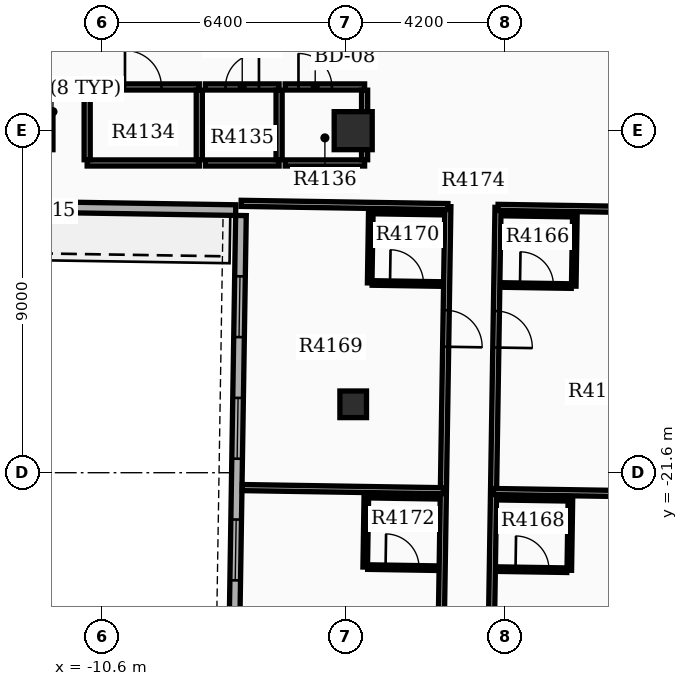
"""IFC4 building model, lengths in metres.
Left out: names, types, materials, properties, quantities, classifications, styles, units other than length and angle.
Written with IfcOpenShell. Run it as: python <this file> out.ifc"""

import sys

from ifc_helpers import new_model, si_unit, direction, frame, frame_2d, origin, origin_2d, place, context, subcontext, project, spatial, rectangle, extrude, element, fill, save


model = new_model("IFC4")
c1 = context("Model", 3, precision=1e-05, world=origin(), true_north=direction((0.0, 1.0)))
c2 = subcontext(c1, "Body", "Model", "MODEL_VIEW")
j1 = project(units=[si_unit("LENGTHUNIT", "METRE"), si_unit("PLANEANGLEUNIT", "RADIAN")], contexts=[c1])
p1 = place(None, origin())
s1 = spatial("IfcSite", under=j1, at=p1, CompositionType="ELEMENT")
p2 = place(p1, origin())
s2 = spatial("IfcBuilding", under=s1, at=p2, CompositionType="ELEMENT")
p3 = place(p2, frame((0.0, 0.0, 261.6)))
s3 = spatial("IfcBuildingStorey", under=s2, at=p3, CompositionType="ELEMENT", Elevation=261.6)
for number, where, z_axis, x_axis in (
    (1, (-12.4, -12.6, 0.0), (0.0, 0.0, 1.0), (1.0, 0.0, 0.0)),
    (2, (-4.0, -12.6, 0.0), (0.0, 0.0, 1.0), (1.0, 0.0, 0.0)),
):
    element("IfcColumn", number, at=place(p3, frame(where, z_axis=z_axis, x_axis=x_axis)), inside=s3, PredefinedType="COLUMN", context=c2, shape_type="SweptSolid", body=[
        extrude(rectangle(XDim=1.0, YDim=1.0, at=origin_2d()), origin(), (0.0, 0.0, 1.0), 3.9),
    ])
p4 = place(p3, frame((-4.0, -19.8, 0.0), z_axis=(0.0, 0.0, 1.0), x_axis=(1.0, 0.0, 0.0)))
e3 = element("IfcColumn", 3, at=p4, inside=s3, PredefinedType="COLUMN", context=c2, shape_type="SweptSolid", body=[
    extrude(rectangle(XDim=0.7, YDim=0.7, at=origin_2d()), origin(), (0.0, 0.0, 1.0), 3.9),
])
p5 = place(p3, frame((-6.954, -14.833, 0.0), z_axis=(0.0, 0.0, 1.0), x_axis=(-0.015711302158, -0.999876569875, 0.0)))
e4 = element("IfcWall", 4, at=p5, inside=s3, PredefinedType="STANDARD", context=c2, shape_type="SweptSolid", body=[
    extrude(rectangle(XDim=14.7, YDim=0.28, at=frame_2d((7.35, 0.0))), origin(), (0.0, 0.0, 1.0), 3.18),
])
p6 = place(p5, frame((1.6, 0.0, 0.8)))
e5 = element("IfcOpeningElement", 5, at=p6, cuts=e4, PredefinedType="OPENING", context=c2, shape_type="SweptSolid", body=[
    extrude(rectangle(XDim=1.6, YDim=1.7, at=frame_2d((0.8, 0.85))), frame((0.0, 0.15, 0.0), z_axis=(0.0, -1.0, 0.0), x_axis=(1.0, 0.0, 0.0)), (0.0, 0.0, 1.0), 0.3),
])
p7 = place(p5, frame((4.8, 0.0, 0.8)))
e6 = element("IfcOpeningElement", 6, at=p7, cuts=e4, PredefinedType="OPENING", context=c2, shape_type="SweptSolid", body=[
    extrude(rectangle(XDim=1.6, YDim=1.7, at=frame_2d((0.8, 0.85))), frame((0.0, 0.15, 0.0), z_axis=(0.0, -1.0, 0.0), x_axis=(1.0, 0.0, 0.0)), (0.0, 0.0, 1.0), 0.3),
])
p8 = place(p5, frame((8.0, 0.0, 0.8)))
e7 = element("IfcOpeningElement", 7, at=p8, cuts=e4, PredefinedType="OPENING", context=c2, shape_type="SweptSolid", body=[
    extrude(rectangle(XDim=1.6, YDim=1.7, at=frame_2d((0.8, 0.85))), frame((0.0, 0.15, 0.0), z_axis=(0.0, -1.0, 0.0), x_axis=(1.0, 0.0, 0.0)), (0.0, 0.0, 1.0), 0.3),
])
p9 = place(p5, frame((11.2, 0.0, 0.8)))
e8 = element("IfcOpeningElement", 8, at=p9, cuts=e4, PredefinedType="OPENING", context=c2, shape_type="SweptSolid", body=[
    extrude(rectangle(XDim=1.6, YDim=1.7, at=frame_2d((0.8, 0.85))), frame((0.0, 0.15, 0.0), z_axis=(0.0, -1.0, 0.0), x_axis=(1.0, 0.0, 0.0)), (0.0, 0.0, 1.0), 0.3),
])
p10 = place(p3, frame((-13.391, -14.592, 0.0), z_axis=(0.0, 0.0, 1.0), x_axis=(0.999876833368, -0.015694524359, 0.0)))
e9 = element("IfcWall", 9, at=p10, inside=s3, PredefinedType="STANDARD", context=c2, shape_type="SweptSolid", body=[
    extrude(rectangle(XDim=6.3, YDim=0.28, at=frame_2d((3.15, 0.0))), origin(), (0.0, 0.0, 1.0), 3.18),
])
p11 = place(p3, frame((-11.0, -13.45, 0.0), z_axis=(0.0, 0.0, 1.0), x_axis=(1.0, 0.0, 0.0)))
e10 = element("IfcWall", 10, at=p11, inside=s3, PredefinedType="PARTITIONING", context=c2, shape_type="SweptSolid", body=[
    extrude(rectangle(XDim=2.95, YDim=0.16, at=frame_2d((1.475, 0.0))), origin(), (0.0, 0.0, 1.0), 3.17),
])
p12 = place(p3, frame((-11.0, -11.45, 0.0), z_axis=(0.0, 0.0, 1.0), x_axis=(1.0, 0.0, 0.0)))
e11 = element("IfcWall", 11, at=p12, inside=s3, PredefinedType="PARTITIONING", context=c2, shape_type="SweptSolid", body=[
    extrude(rectangle(XDim=2.95, YDim=0.16, at=frame_2d((1.475, 0.0))), origin(), (0.0, 0.0, 1.0), 3.17),
])
p13 = place(p12, frame((0.995, 0.0, 0.0)))
e12 = element("IfcOpeningElement", 12, at=p13, cuts=e11, PredefinedType="OPENING", context=c2, shape_type="SweptSolid", body=[
    extrude(rectangle(XDim=0.96, YDim=2.15, at=frame_2d((0.48, 1.075))), frame((0.0, 0.09, 0.0), z_axis=(0.0, -1.0, 0.0), x_axis=(1.0, 0.0, 0.0)), (0.0, 0.0, 1.0), 0.18),
])
for number, where, z_axis, x_axis in (
    (13, (-11.0, -13.365, 0.0), (0.0, 0.0, 1.0), (0.0, 1.0, 0.0)),
    (14, (-8.05, -13.365, 0.0), (0.0, 0.0, 1.0), (0.0, 1.0, 0.0)),
):
    element("IfcWall", number, at=place(p3, frame(where, z_axis=z_axis, x_axis=x_axis)), inside=s3, PredefinedType="PARTITIONING", context=c2, shape_type="SweptSolid", body=[
        extrude(rectangle(XDim=1.83, YDim=0.16, at=frame_2d((0.915, 0.0))), origin(), (0.0, 0.0, 1.0), 3.17),
    ])
p14 = place(p3, frame((-7.89, -13.45, 0.0), z_axis=(0.0, 0.0, 1.0), x_axis=(1.0, 0.0, 0.0)))
e15 = element("IfcWall", 15, at=p14, inside=s3, PredefinedType="PARTITIONING", context=c2, shape_type="SweptSolid", body=[
    extrude(rectangle(XDim=1.94, YDim=0.16, at=frame_2d((0.97, 0.0))), origin(), (0.0, 0.0, 1.0), 3.17),
])
p15 = place(p3, frame((-7.89, -11.45, 0.0), z_axis=(0.0, 0.0, 1.0), x_axis=(1.0, 0.0, 0.0)))
e16 = element("IfcWall", 16, at=p15, inside=s3, PredefinedType="PARTITIONING", context=c2, shape_type="SweptSolid", body=[
    extrude(rectangle(XDim=1.94, YDim=0.16, at=frame_2d((0.97, 0.0))), origin(), (0.0, 0.0, 1.0), 3.17),
])
p16 = place(p15, frame((0.53, 0.0, 0.0)))
e17 = element("IfcOpeningElement", 17, at=p16, cuts=e16, PredefinedType="OPENING", context=c2, shape_type="SweptSolid", body=[
    extrude(rectangle(XDim=0.88, YDim=2.1, at=frame_2d((0.44, 1.05))), frame((0.0, 0.09, 0.0), z_axis=(0.0, -1.0, 0.0), x_axis=(1.0, 0.0, 0.0)), (0.0, 0.0, 1.0), 0.18),
])
p17 = place(p3, frame((-5.95, -13.365, 0.0), z_axis=(0.0, 0.0, 1.0), x_axis=(0.0, 1.0, 0.0)))
e18 = element("IfcWall", 18, at=p17, inside=s3, PredefinedType="PARTITIONING", context=c2, shape_type="SweptSolid", body=[
    extrude(rectangle(XDim=1.83, YDim=0.16, at=frame_2d((0.915, 0.0))), origin(), (0.0, 0.0, 1.0), 3.17),
])
p18 = place(p3, frame((-5.79, -13.45, 0.0), z_axis=(0.0, 0.0, 1.0), x_axis=(1.0, 0.0, 0.0)))
e19 = element("IfcWall", 19, at=p18, inside=s3, PredefinedType="PARTITIONING", context=c2, shape_type="SweptSolid", body=[
    extrude(rectangle(XDim=2.09, YDim=0.16, at=frame_2d((1.045, 0.0))), origin(), (0.0, 0.0, 1.0), 3.17),
])
p19 = place(p3, frame((-5.79, -11.45, 0.0), z_axis=(0.0, 0.0, 1.0), x_axis=(1.0, 0.0, 0.0)))
e20 = element("IfcWall", 20, at=p19, inside=s3, PredefinedType="PARTITIONING", context=c2, shape_type="SweptSolid", body=[
    extrude(rectangle(XDim=2.09, YDim=0.16, at=frame_2d((1.045, 0.0))), origin(), (0.0, 0.0, 1.0), 3.17),
])
p20 = place(p19, frame((0.35, 0.0, 0.0)))
e21 = element("IfcOpeningElement", 21, at=p20, cuts=e20, PredefinedType="OPENING", context=c2, shape_type="SweptSolid", body=[
    extrude(rectangle(XDim=0.88, YDim=2.15, at=frame_2d((0.44, 1.075))), frame((0.0, 0.09, 0.0), z_axis=(0.0, -1.0, 0.0), x_axis=(1.0, 0.0, 0.0)), (0.0, 0.0, 1.0), 0.18),
])
p21 = place(p3, frame((-3.7, -13.365, 0.0), z_axis=(0.0, 0.0, 1.0), x_axis=(0.0, 1.0, 0.0)))
e22 = element("IfcWall", 22, at=p21, inside=s3, PredefinedType="PARTITIONING", context=c2, shape_type="SweptSolid", body=[
    extrude(rectangle(XDim=1.83, YDim=0.16, at=frame_2d((0.915, 0.0))), origin(), (0.0, 0.0, 1.0), 3.17),
])
p22 = place(p3, frame((-0.19, -14.619, 0.0), z_axis=(0.0, 0.0, 1.0), x_axis=(-0.015710232149, -0.999876586687, 0.0)))
e23 = element("IfcWall", 23, at=p22, inside=s3, PredefinedType="PARTITIONING", context=c2, shape_type="SweptSolid", body=[
    extrude(rectangle(XDim=15.012, YDim=0.16, at=frame_2d((7.506, 0.0))), origin(), (0.0, 0.0, 1.0), 3.17),
])
p23 = place(p22, frame((2.728, 0.0, 0.0)))
e24 = element("IfcOpeningElement", 24, at=p23, cuts=e23, PredefinedType="OPENING", context=c2, shape_type="SweptSolid", body=[
    extrude(rectangle(XDim=0.96, YDim=2.15, at=frame_2d((0.48, 1.075))), frame((0.0, 0.09, 0.0), z_axis=(0.0, -1.0, 0.0), x_axis=(1.0, 0.0, 0.0)), (0.0, 0.0, 1.0), 0.18),
])
p24 = place(p22, frame((13.76, 0.0, 0.0)))
e25 = element("IfcOpeningElement", 25, at=p24, cuts=e23, PredefinedType="OPENING", context=c2, shape_type="SweptSolid", body=[
    extrude(rectangle(XDim=0.96, YDim=2.15, at=frame_2d((0.48, 1.075))), frame((0.0, 0.09, 0.0), z_axis=(0.0, -1.0, 0.0), x_axis=(1.0, 0.0, 0.0)), (0.0, 0.0, 1.0), 0.18),
])
p25 = place(p3, frame((-0.19, -14.619, 0.0), z_axis=(0.0, 0.0, 1.0), x_axis=(0.999877076246, -0.015679043267, 0.0)))
e26 = element("IfcWall", 26, at=p25, inside=s3, PredefinedType="PARTITIONING", context=c2, shape_type="SweptSolid", body=[
    extrude(rectangle(XDim=6.68, YDim=0.16, at=frame_2d((3.34, 0.0))), origin(), (0.0, 0.0, 1.0), 3.17),
])
p26 = place(p3, frame((-0.307, -22.095, 0.0), z_axis=(0.0, 0.0, 1.0), x_axis=(0.999876781534, -0.015697826265, 0.0)))
e27 = element("IfcWall", 27, at=p26, inside=s3, PredefinedType="PARTITIONING", context=c2, shape_type="SweptSolid", body=[
    extrude(rectangle(XDim=6.532, YDim=0.16, at=frame_2d((3.266, 0.0))), origin(), (0.0, 0.0, 1.0), 3.17),
])
p27 = place(p3, frame((-0.082, -16.661, 0.0), z_axis=(0.0, 0.0, 1.0), x_axis=(0.999876836305, -0.015694337248, 0.0)))
e28 = element("IfcWall", 28, at=p27, inside=s3, PredefinedType="PARTITIONING", context=c2, shape_type="SweptSolid", body=[
    extrude(rectangle(XDim=1.82, YDim=0.12, at=frame_2d((0.91, 0.0))), origin(), (0.0, 0.0, 1.0), 3.17),
])
p28 = place(p27, frame((0.47, 0.0, 0.0)))
e29 = element("IfcOpeningElement", 29, at=p28, cuts=e28, PredefinedType="OPENING", context=c2, shape_type="SweptSolid", body=[
    extrude(rectangle(XDim=0.88, YDim=2.1, at=frame_2d((0.44, 1.05))), frame((0.0, 0.07, 0.0), z_axis=(0.0, -1.0, 0.0), x_axis=(1.0, 0.0, 0.0)), (0.0, 0.0, 1.0), 0.14),
])
p29 = place(p3, frame((-0.052, -14.781, 0.0), z_axis=(0.0, 0.0, 1.0), x_axis=(0.999876836305, -0.015694337248, 0.0)))
e30 = element("IfcWall", 30, at=p29, inside=s3, PredefinedType="PARTITIONING", context=c2, shape_type="SweptSolid", body=[
    extrude(rectangle(XDim=1.82, YDim=0.12, at=frame_2d((0.91, 0.0))), origin(), (0.0, 0.0, 1.0), 3.17),
])
p30 = place(p3, frame((1.833, -14.811, 0.0), z_axis=(0.0, 0.0, 1.0), x_axis=(-0.01571234584, -0.999876553475, 0.0)))
e31 = element("IfcWall", 31, at=p30, inside=s3, PredefinedType="PARTITIONING", context=c2, shape_type="SweptSolid", body=[
    extrude(rectangle(XDim=1.88, YDim=0.12, at=frame_2d((0.94, 0.0))), origin(), (0.0, 0.0, 1.0), 3.17),
])
p31 = place(p3, frame((-0.199, -24.137, 0.0), z_axis=(0.0, 0.0, 1.0), x_axis=(0.999876836305, -0.015694337248, 0.0)))
e32 = element("IfcWall", 32, at=p31, inside=s3, PredefinedType="PARTITIONING", context=c2, shape_type="SweptSolid", body=[
    extrude(rectangle(XDim=1.82, YDim=0.12, at=frame_2d((0.91, 0.0))), origin(), (0.0, 0.0, 1.0), 3.17),
])
p32 = place(p31, frame((0.47, 0.0, 0.0)))
e33 = element("IfcOpeningElement", 33, at=p32, cuts=e32, PredefinedType="OPENING", context=c2, shape_type="SweptSolid", body=[
    extrude(rectangle(XDim=0.88, YDim=2.1, at=frame_2d((0.44, 1.05))), frame((0.0, 0.07, 0.0), z_axis=(0.0, -1.0, 0.0), x_axis=(1.0, 0.0, 0.0)), (0.0, 0.0, 1.0), 0.14),
])
p33 = place(p3, frame((-0.17, -22.257, 0.0), z_axis=(0.0, 0.0, 1.0), x_axis=(0.999876836305, -0.015694337248, 0.0)))
e34 = element("IfcWall", 34, at=p33, inside=s3, PredefinedType="PARTITIONING", context=c2, shape_type="SweptSolid", body=[
    extrude(rectangle(XDim=1.82, YDim=0.12, at=frame_2d((0.91, 0.0))), origin(), (0.0, 0.0, 1.0), 3.17),
])
p34 = place(p3, frame((1.715, -22.287, 0.0), z_axis=(0.0, 0.0, 1.0), x_axis=(-0.01571234584, -0.999876553475, 0.0)))
e35 = element("IfcWall", 35, at=p34, inside=s3, PredefinedType="PARTITIONING", context=c2, shape_type="SweptSolid", body=[
    extrude(rectangle(XDim=1.88, YDim=0.12, at=frame_2d((0.94, 0.0))), origin(), (0.0, 0.0, 1.0), 3.17),
])
p35 = place(p3, frame((-1.51, -14.598, 0.0), z_axis=(0.0, 0.0, 1.0), x_axis=(-0.015709976686, -0.999876590701, 0.0)))
e36 = element("IfcWall", 36, at=p35, inside=s3, PredefinedType="PARTITIONING", context=c2, shape_type="SweptSolid", body=[
    extrude(rectangle(XDim=15.012, YDim=0.16, at=frame_2d((7.506, 0.0))), origin(), (0.0, 0.0, 1.0), 3.17),
])
p36 = place(p35, frame((2.728, 0.0, 0.0)))
e37 = element("IfcOpeningElement", 37, at=p36, cuts=e36, PredefinedType="OPENING", context=c2, shape_type="SweptSolid", body=[
    extrude(rectangle(XDim=0.96, YDim=2.15, at=frame_2d((0.48, 1.075))), frame((0.0, 0.09, 0.0), z_axis=(0.0, -1.0, 0.0), x_axis=(1.0, 0.0, 0.0)), (0.0, 0.0, 1.0), 0.18),
])
p37 = place(p35, frame((13.76, 0.0, 0.0)))
e38 = element("IfcOpeningElement", 38, at=p37, cuts=e36, PredefinedType="OPENING", context=c2, shape_type="SweptSolid", body=[
    extrude(rectangle(XDim=0.96, YDim=2.15, at=frame_2d((0.48, 1.075))), frame((0.0, 0.09, 0.0), z_axis=(0.0, -1.0, 0.0), x_axis=(1.0, 0.0, 0.0)), (0.0, 0.0, 1.0), 0.18),
])
p38 = place(p3, frame((-1.51, -14.598, 0.0), z_axis=(0.0, 0.0, 1.0), x_axis=(-0.999876622965, 0.015707923068, 0.0)))
e39 = element("IfcWall", 39, at=p38, inside=s3, PredefinedType="PARTITIONING", context=c2, shape_type="SweptSolid", body=[
    extrude(rectangle(XDim=5.44, YDim=0.16, at=frame_2d((2.72, 0.0))), origin(), (0.0, 0.0, 1.0), 3.17),
])
p39 = place(p3, frame((-1.627, -22.074, 0.0), z_axis=(0.0, 0.0, 1.0), x_axis=(-0.999876245763, 0.015731915277, 0.0)))
e40 = element("IfcWall", 40, at=p39, inside=s3, PredefinedType="PARTITIONING", context=c2, shape_type="SweptSolid", body=[
    extrude(rectangle(XDim=5.292, YDim=0.16, at=frame_2d((2.646, 0.0))), origin(), (0.0, 0.0, 1.0), 3.17),
])
p40 = place(p3, frame((-3.501, -16.607, 0.0), z_axis=(0.0, 0.0, 1.0), x_axis=(0.999878932289, -0.015560230231, 0.0)))
e41 = element("IfcWall", 41, at=p40, inside=s3, PredefinedType="PARTITIONING", context=c2, shape_type="SweptSolid", body=[
    extrude(rectangle(XDim=1.82, YDim=0.12, at=frame_2d((0.91, 0.0))), origin(), (0.0, 0.0, 1.0), 3.17),
])
p41 = place(p40, frame((0.47, 0.0, 0.0)))
e42 = element("IfcOpeningElement", 42, at=p41, cuts=e41, PredefinedType="OPENING", context=c2, shape_type="SweptSolid", body=[
    extrude(rectangle(XDim=0.88, YDim=2.1, at=frame_2d((0.44, 1.05))), frame((0.0, 0.07, 0.0), z_axis=(0.0, -1.0, 0.0), x_axis=(1.0, 0.0, 0.0)), (0.0, 0.0, 1.0), 0.14),
])
p42 = place(p3, frame((-3.472, -14.727, 0.0), z_axis=(0.0, 0.0, 1.0), x_axis=(0.999876803258, -0.015696442504, 0.0)))
e43 = element("IfcWall", 43, at=p42, inside=s3, PredefinedType="PARTITIONING", context=c2, shape_type="SweptSolid", body=[
    extrude(rectangle(XDim=1.82, YDim=0.12, at=frame_2d((0.91, 0.0))), origin(), (0.0, 0.0, 1.0), 3.17),
])
p43 = place(p3, frame((-3.537, -14.726, 0.0), z_axis=(0.0, 0.0, 1.0), x_axis=(-0.015844224657, -0.999874472394, 0.0)))
e44 = element("IfcWall", 44, at=p43, inside=s3, PredefinedType="PARTITIONING", context=c2, shape_type="SweptSolid", body=[
    extrude(rectangle(XDim=1.88, YDim=0.12, at=frame_2d((0.94, 0.0))), origin(), (0.0, 0.0, 1.0), 3.17),
])
p44 = place(p3, frame((-3.619, -24.083, 0.0), z_axis=(0.0, 0.0, 1.0), x_axis=(0.999874688728, -0.015830566654, 0.0)))
e45 = element("IfcWall", 45, at=p44, inside=s3, PredefinedType="PARTITIONING", context=c2, shape_type="SweptSolid", body=[
    extrude(rectangle(XDim=1.82, YDim=0.12, at=frame_2d((0.91, 0.0))), origin(), (0.0, 0.0, 1.0), 3.17),
])
p45 = place(p44, frame((0.47, 0.0, 0.0)))
e46 = element("IfcOpeningElement", 46, at=p45, cuts=e45, PredefinedType="OPENING", context=c2, shape_type="SweptSolid", body=[
    extrude(rectangle(XDim=0.88, YDim=2.1, at=frame_2d((0.44, 1.05))), frame((0.0, 0.07, 0.0), z_axis=(0.0, -1.0, 0.0), x_axis=(1.0, 0.0, 0.0)), (0.0, 0.0, 1.0), 0.14),
])
p46 = place(p3, frame((-3.589, -22.203, 0.0), z_axis=(0.0, 0.0, 1.0), x_axis=(0.999876836305, -0.015694337248, 0.0)))
e47 = element("IfcWall", 47, at=p46, inside=s3, PredefinedType="PARTITIONING", context=c2, shape_type="SweptSolid", body=[
    extrude(rectangle(XDim=1.82, YDim=0.12, at=frame_2d((0.91, 0.0))), origin(), (0.0, 0.0, 1.0), 3.17),
])
p47 = place(p3, frame((-3.654, -22.202, 0.0), z_axis=(0.0, 0.0, 1.0), x_axis=(-0.01558454688, -0.999878553575, 0.0)))
e48 = element("IfcWall", 48, at=p47, inside=s3, PredefinedType="PARTITIONING", context=c2, shape_type="SweptSolid", body=[
    extrude(rectangle(XDim=1.88, YDim=0.12, at=frame_2d((0.94, 0.0))), origin(), (0.0, 0.0, 1.0), 3.17),
])
p48 = place(p6, origin())
e49 = element("IfcWindow", 49, at=p48, inside=s3, PartitioningType="SINGLE_PANEL", PredefinedType="WINDOW", context=c2, shape_type="SweptSolid", body=[
    extrude(rectangle(XDim=1.6, YDim=1.7, at=frame_2d((0.8, 0.85))), frame((0.0, 0.03, 0.0), z_axis=(0.0, -1.0, 0.0), x_axis=(1.0, 0.0, 0.0)), (0.0, 0.0, 1.0), 0.06),
])
fill(e5, e49)
p49 = place(p7, origin())
e50 = element("IfcWindow", 50, at=p49, inside=s3, PartitioningType="SINGLE_PANEL", PredefinedType="WINDOW", context=c2, shape_type="SweptSolid", body=[
    extrude(rectangle(XDim=1.6, YDim=1.7, at=frame_2d((0.8, 0.85))), frame((0.0, 0.03, 0.0), z_axis=(0.0, -1.0, 0.0), x_axis=(1.0, 0.0, 0.0)), (0.0, 0.0, 1.0), 0.06),
])
fill(e6, e50)
p50 = place(p8, origin())
e51 = element("IfcWindow", 51, at=p50, inside=s3, PartitioningType="SINGLE_PANEL", PredefinedType="WINDOW", context=c2, shape_type="SweptSolid", body=[
    extrude(rectangle(XDim=1.6, YDim=1.7, at=frame_2d((0.8, 0.85))), frame((0.0, 0.03, 0.0), z_axis=(0.0, -1.0, 0.0), x_axis=(1.0, 0.0, 0.0)), (0.0, 0.0, 1.0), 0.06),
])
fill(e7, e51)
p51 = place(p13, origin())
e52 = element("IfcDoor", 52, at=p51, inside=s3, OperationType="SINGLE_SWING_LEFT", PredefinedType="DOOR", context=c2, shape_type="SweptSolid", body=[
    extrude(rectangle(XDim=0.96, YDim=2.15, at=frame_2d((0.48, 1.075))), frame((0.0, 0.025, 0.0), z_axis=(0.0, -1.0, 0.0), x_axis=(1.0, 0.0, 0.0)), (0.0, 0.0, 1.0), 0.05),
])
fill(e12, e52)
p52 = place(p16, origin())
e53 = element("IfcDoor", 53, at=p52, inside=s3, OperationType="SINGLE_SWING_RIGHT", PredefinedType="DOOR", context=c2, shape_type="SweptSolid", body=[
    extrude(rectangle(XDim=0.88, YDim=2.1, at=frame_2d((0.44, 1.05))), frame((0.0, 0.025, 0.0), z_axis=(0.0, -1.0, 0.0), x_axis=(1.0, 0.0, 0.0)), (0.0, 0.0, 1.0), 0.05),
])
fill(e17, e53)
p53 = place(p20, origin())
e54 = element("IfcDoor", 54, at=p53, inside=s3, OperationType="SINGLE_SWING_LEFT", PredefinedType="DOOR", context=c2, shape_type="SweptSolid", body=[
    extrude(rectangle(XDim=0.88, YDim=2.15, at=frame_2d((0.44, 1.075))), frame((0.0, 0.025, 0.0), z_axis=(0.0, -1.0, 0.0), x_axis=(1.0, 0.0, 0.0)), (0.0, 0.0, 1.0), 0.05),
])
fill(e21, e54)
p54 = place(p23, origin())
e55 = element("IfcDoor", 55, at=p54, inside=s3, OperationType="SINGLE_SWING_RIGHT", PredefinedType="DOOR", context=c2, shape_type="SweptSolid", body=[
    extrude(rectangle(XDim=0.96, YDim=2.15, at=frame_2d((0.48, 1.075))), frame((0.0, 0.025, 0.0), z_axis=(0.0, -1.0, 0.0), x_axis=(1.0, 0.0, 0.0)), (0.0, 0.0, 1.0), 0.05),
])
fill(e24, e55)
p55 = place(p28, origin())
e56 = element("IfcDoor", 56, at=p55, inside=s3, OperationType="SINGLE_SWING_LEFT", PredefinedType="DOOR", context=c2, shape_type="SweptSolid", body=[
    extrude(rectangle(XDim=0.88, YDim=2.1, at=frame_2d((0.44, 1.05))), frame((0.0, 0.025, 0.0), z_axis=(0.0, -1.0, 0.0), x_axis=(1.0, 0.0, 0.0)), (0.0, 0.0, 1.0), 0.05),
])
fill(e29, e56)
p56 = place(p32, origin())
e57 = element("IfcDoor", 57, at=p56, inside=s3, OperationType="SINGLE_SWING_LEFT", PredefinedType="DOOR", context=c2, shape_type="SweptSolid", body=[
    extrude(rectangle(XDim=0.88, YDim=2.1, at=frame_2d((0.44, 1.05))), frame((0.0, 0.025, 0.0), z_axis=(0.0, -1.0, 0.0), x_axis=(1.0, 0.0, 0.0)), (0.0, 0.0, 1.0), 0.05),
])
fill(e33, e57)
p57 = place(p36, origin())
e58 = element("IfcDoor", 58, at=p57, inside=s3, OperationType="SINGLE_SWING_RIGHT", PredefinedType="DOOR", context=c2, shape_type="SweptSolid", body=[
    extrude(rectangle(XDim=0.96, YDim=2.15, at=frame_2d((0.48, 1.075))), frame((0.0, 0.025, 0.0), z_axis=(0.0, -1.0, 0.0), x_axis=(1.0, 0.0, 0.0)), (0.0, 0.0, 1.0), 0.05),
])
fill(e37, e58)
p58 = place(p41, origin())
e59 = element("IfcDoor", 59, at=p58, inside=s3, OperationType="SINGLE_SWING_LEFT", PredefinedType="DOOR", context=c2, shape_type="SweptSolid", body=[
    extrude(rectangle(XDim=0.88, YDim=2.1, at=frame_2d((0.44, 1.05))), frame((0.0, 0.025, 0.0), z_axis=(0.0, -1.0, 0.0), x_axis=(1.0, 0.0, 0.0)), (0.0, 0.0, 1.0), 0.05),
])
fill(e42, e59)
p59 = place(p45, origin())
e60 = element("IfcDoor", 60, at=p59, inside=s3, OperationType="SINGLE_SWING_LEFT", PredefinedType="DOOR", context=c2, shape_type="SweptSolid", body=[
    extrude(rectangle(XDim=0.88, YDim=2.1, at=frame_2d((0.44, 1.05))), frame((0.0, 0.025, 0.0), z_axis=(0.0, -1.0, 0.0), x_axis=(1.0, 0.0, 0.0)), (0.0, 0.0, 1.0), 0.05),
])
fill(e46, e60)
save(model, sys.argv[1])
